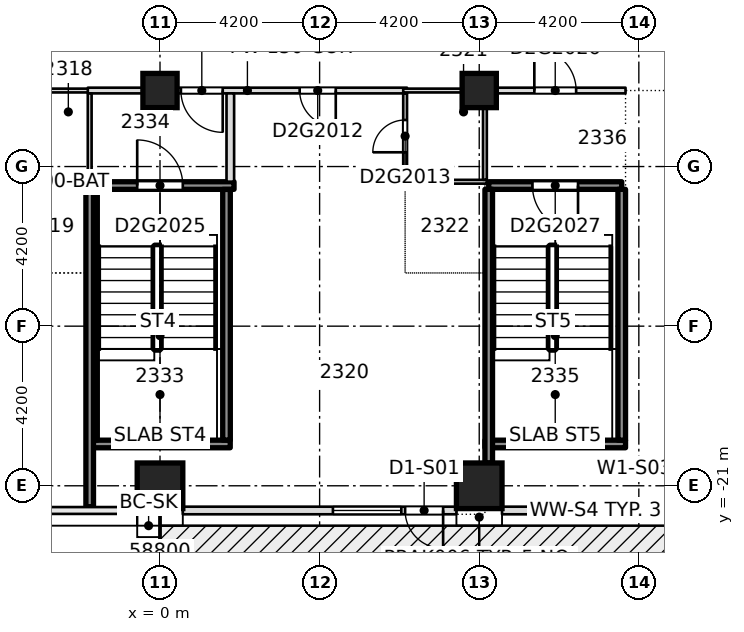
"""IFC4 building model, lengths in metres.
Left out: names, types, materials, properties, quantities, classifications, styles, units other than length and angle.
Written with IfcOpenShell. Run it as: python <this file> out.ifc"""

import sys

from ifc_helpers import new_model, si_unit, direction, frame, frame_2d, origin, origin_2d, place, context, subcontext, project, spatial, rectangle, extrude, element, fill, save


model = new_model("IFC4")
c1 = context("Model", 3, precision=1e-05, world=origin(), true_north=direction((0.0, 1.0)))
c2 = subcontext(c1, "Body", "Model", "MODEL_VIEW")
j1 = project(units=[si_unit("LENGTHUNIT", "METRE"), si_unit("PLANEANGLEUNIT", "RADIAN")], contexts=[c1])
p1 = place(None, origin())
s1 = spatial("IfcSite", under=j1, at=p1, CompositionType="ELEMENT")
p2 = place(p1, origin())
s2 = spatial("IfcBuilding", under=s1, at=p2, CompositionType="ELEMENT")
p3 = place(p2, frame((0.0, 0.0, 94.2)))
s3 = spatial("IfcBuildingStorey", under=s2, at=p3, CompositionType="ELEMENT", Elevation=94.2)
for number, where, z_axis, x_axis in (
    (1, (0.0, -21.0, -0.32), (0.0, 0.0, 1.0), (1.0, 0.0, 0.0)),
    (2, (8.4, -21.0, -0.32), (0.0, 0.0, 1.0), (1.0, 0.0, 0.0)),
):
    element("IfcColumn", number, at=place(p3, frame(where, z_axis=z_axis, x_axis=x_axis)), inside=s3, PredefinedType="COLUMN", context=c2, shape_type="SweptSolid", body=[
        extrude(rectangle(XDim=1.2, YDim=1.2, at=origin_2d()), origin(), (0.0, 0.0, 1.0), 3.45),
    ])
for number, where, z_axis, x_axis in (
    (3, (0.0, -10.6, -0.32), (0.0, 0.0, 1.0), (1.0, 0.0, 0.0)),
    (4, (8.4, -10.6, -0.32), (0.0, 0.0, 1.0), (1.0, 0.0, 0.0)),
):
    element("IfcColumn", number, at=place(p3, frame(where, z_axis=z_axis, x_axis=x_axis)), inside=s3, PredefinedType="COLUMN", context=c2, shape_type="SweptSolid", body=[
        extrude(rectangle(XDim=0.9, YDim=0.9, at=origin_2d()), origin(), (0.0, 0.0, 1.0), 3.45),
    ])
p4 = place(p3, frame((-1.848, -19.9, 0.0), z_axis=(0.0, 0.0, 1.0), x_axis=(1.0, 0.0, 0.0)))
e5 = element("IfcWall", 5, at=p4, inside=s3, PredefinedType="SOLIDWALL", context=c2, shape_type="SweptSolid", body=[
    extrude(rectangle(XDim=3.696, YDim=0.2, at=frame_2d((1.848, 0.0))), origin(), (0.0, 0.0, 1.0), 3.13),
])
p5 = place(p3, frame((-1.748, -13.1, 0.0), z_axis=(0.0, 0.0, 1.0), x_axis=(1.0, 0.0, 0.0)))
e6 = element("IfcWall", 6, at=p5, inside=s3, PredefinedType="SOLIDWALL", context=c2, shape_type="SweptSolid", body=[
    extrude(rectangle(XDim=3.696, YDim=0.2, at=frame_2d((1.848, 0.0))), origin(), (0.0, 0.0, 1.0), 3.13),
])
p6 = place(p5, frame((1.148, 0.0, 0.0)))
e7 = element("IfcOpeningElement", 7, at=p6, cuts=e6, PredefinedType="OPENING", context=c2, shape_type="SweptSolid", body=[
    extrude(rectangle(XDim=1.2, YDim=2.1, at=frame_2d((0.6, 1.05))), frame((0.0, 0.11, 0.0), z_axis=(0.0, -1.0, 0.0), x_axis=(1.0, 0.0, 0.0)), (0.0, 0.0, 1.0), 0.22),
])
p7 = place(p3, frame((8.65, -13.1, 0.0), z_axis=(0.0, 0.0, 1.0), x_axis=(1.0, 0.0, 0.0)))
e8 = element("IfcWall", 8, at=p7, inside=s3, PredefinedType="SOLIDWALL", context=c2, shape_type="SweptSolid", body=[
    extrude(rectangle(XDim=3.5, YDim=0.2, at=frame_2d((1.75, 0.0))), origin(), (0.0, 0.0, 1.0), 3.13),
])
p8 = place(p7, frame((1.15, 0.0, 0.0)))
e9 = element("IfcOpeningElement", 9, at=p8, cuts=e8, PredefinedType="OPENING", context=c2, shape_type="SweptSolid", body=[
    extrude(rectangle(XDim=1.2, YDim=2.1, at=frame_2d((0.6, 1.05))), frame((0.0, 0.11, 0.0), z_axis=(0.0, -1.0, 0.0), x_axis=(1.0, 0.0, 0.0)), (0.0, 0.0, 1.0), 0.22),
])
p9 = place(p3, frame((-4.0, -13.0, 0.0), z_axis=(0.0, 0.0, 1.0), x_axis=(1.0, 0.0, 0.0)))
e10 = element("IfcWall", 10, at=p9, inside=s3, PredefinedType="PARTITIONING", context=c2, shape_type="SweptSolid", body=[
    extrude(rectangle(XDim=2.25, YDim=0.1, at=frame_2d((1.125, 0.0))), origin(), (0.0, 0.0, 1.0), 3.13),
])
p10 = place(p3, frame((6.4, -13.0, 0.0), z_axis=(0.0, 0.0, 1.0), x_axis=(1.0, 0.0, 0.0)))
e11 = element("IfcWall", 11, at=p10, inside=s3, PredefinedType="PARTITIONING", context=c2, shape_type="SweptSolid", body=[
    extrude(rectangle(XDim=2.2, YDim=0.1, at=frame_2d((1.1, 0.0))), origin(), (0.0, 0.0, 1.0), 3.13),
])
p11 = place(p3, frame((-4.0, -10.6, 0.0), z_axis=(0.0, 0.0, 1.0), x_axis=(1.0, 0.0, 0.0)))
e12 = element("IfcWall", 12, at=p11, inside=s3, PredefinedType="PARTITIONING", context=c2, shape_type="SweptSolid", body=[
    extrude(rectangle(XDim=2.2, YDim=0.1, at=frame_2d((1.1, 0.0))), origin(), (0.0, 0.0, 1.0), 3.13),
])
p12 = place(p3, frame((-1.9, -10.6, 0.0), z_axis=(0.0, 0.0, 1.0), x_axis=(1.0, 0.0, 0.0)))
e13 = element("IfcWall", 13, at=p12, inside=s3, PredefinedType="PARTITIONING", context=c2, shape_type="SweptSolid", body=[
    extrude(rectangle(XDim=8.4, YDim=0.15, at=frame_2d((4.2, 0.0))), origin(), (0.0, 0.0, 1.0), 3.13),
])
p13 = place(p12, frame((5.575, 0.0, 0.0)))
e14 = element("IfcOpeningElement", 14, at=p13, cuts=e13, PredefinedType="OPENING", context=c2, shape_type="SweptSolid", body=[
    extrude(rectangle(XDim=0.95, YDim=2.1, at=frame_2d((0.475, 1.05))), frame((0.0, 0.085, 0.0), z_axis=(0.0, -1.0, 0.0), x_axis=(1.0, 0.0, 0.0)), (0.0, 0.0, 1.0), 0.17),
])
p14 = place(p12, frame((2.45, 0.0, 0.0)))
e15 = element("IfcOpeningElement", 15, at=p14, cuts=e13, PredefinedType="OPENING", context=c2, shape_type="SweptSolid", body=[
    extrude(rectangle(XDim=1.1, YDim=2.1, at=frame_2d((0.55, 1.05))), frame((0.0, 0.085, 0.0), z_axis=(0.0, -1.0, 0.0), x_axis=(1.0, 0.0, 0.0)), (0.0, 0.0, 1.0), 0.17),
])
p15 = place(p3, frame((6.4, -10.6, 0.0), z_axis=(0.0, 0.0, 1.0), x_axis=(1.0, 0.0, 0.0)))
e16 = element("IfcWall", 16, at=p15, inside=s3, PredefinedType="PARTITIONING", context=c2, shape_type="SweptSolid", body=[
    extrude(rectangle(XDim=2.2, YDim=0.1, at=frame_2d((1.1, 0.0))), origin(), (0.0, 0.0, 1.0), 3.13),
])
p16 = place(p3, frame((8.5, -10.6, 0.0), z_axis=(0.0, 0.0, 1.0), x_axis=(1.0, 0.0, 0.0)))
e17 = element("IfcWall", 17, at=p16, inside=s3, PredefinedType="PARTITIONING", context=c2, shape_type="SweptSolid", body=[
    extrude(rectangle(XDim=3.75, YDim=0.15, at=frame_2d((1.875, 0.0))), origin(), (0.0, 0.0, 1.0), 3.13),
])
p17 = place(p16, frame((1.35, 0.0, 0.0)))
e18 = element("IfcOpeningElement", 18, at=p17, cuts=e17, PredefinedType="OPENING", context=c2, shape_type="SweptSolid", body=[
    extrude(rectangle(XDim=1.1, YDim=2.1, at=frame_2d((0.55, 1.05))), frame((0.0, 0.085, 0.0), z_axis=(0.0, -1.0, 0.0), x_axis=(1.0, 0.0, 0.0)), (0.0, 0.0, 1.0), 0.17),
])
p18 = place(p3, frame((-1.85, -12.95, 0.0), z_axis=(0.0, 0.0, 1.0), x_axis=(0.0, 1.0, 0.0)))
e19 = element("IfcWall", 19, at=p18, inside=s3, PredefinedType="PARTITIONING", context=c2, shape_type="SweptSolid", body=[
    extrude(rectangle(XDim=2.275, YDim=0.1, at=frame_2d((1.137, 0.0))), origin(), (0.0, 0.0, 1.0), 3.13),
])
for number, where, z_axis, x_axis in (
    (20, (-1.75, -19.798, 0.0), (0.0, 0.0, 1.0), (0.0, 1.0, 0.0)),
    (21, (1.75, -19.798, 0.0), (0.0, 0.0, 1.0), (0.0, 1.0, 0.0)),
):
    element("IfcWall", number, at=place(p3, frame(where, z_axis=z_axis, x_axis=x_axis)), inside=s3, PredefinedType="SOLIDWALL", context=c2, shape_type="SweptSolid", body=[
        extrude(rectangle(XDim=6.596, YDim=0.2, at=frame_2d((3.298, 0.0))), origin(), (0.0, 0.0, 1.0), 3.13),
    ])
p19 = place(p3, frame((1.85, -12.998, 0.0), z_axis=(0.0, 0.0, 1.0), x_axis=(0.0, 1.0, 0.0)))
e22 = element("IfcWall", 22, at=p19, inside=s3, PredefinedType="PARTITIONING", context=c2, shape_type="SweptSolid", body=[
    extrude(rectangle(XDim=2.323, YDim=0.2, at=frame_2d((1.162, 0.0))), origin(), (0.0, 0.0, 1.0), 3.13),
])
p20 = place(p3, frame((6.45, -12.95, 0.0), z_axis=(0.0, 0.0, 1.0), x_axis=(0.0, 1.0, 0.0)))
e23 = element("IfcWall", 23, at=p20, inside=s3, PredefinedType="PARTITIONING", context=c2, shape_type="SweptSolid", body=[
    extrude(rectangle(XDim=2.275, YDim=0.1, at=frame_2d((1.137, 0.0))), origin(), (0.0, 0.0, 1.0), 3.13),
])
p21 = place(p20, frame((0.725, 0.0, 0.0)))
e24 = element("IfcOpeningElement", 24, at=p21, cuts=e23, PredefinedType="OPENING", context=c2, shape_type="SweptSolid", body=[
    extrude(rectangle(XDim=0.85, YDim=2.1, at=frame_2d((0.425, 1.05))), frame((0.0, 0.06, 0.0), z_axis=(0.0, -1.0, 0.0), x_axis=(1.0, 0.0, 0.0)), (0.0, 0.0, 1.0), 0.12),
])
p22 = place(p3, frame((8.55, -12.95, 0.0), z_axis=(0.0, 0.0, 1.0), x_axis=(0.0, 1.0, 0.0)))
e25 = element("IfcWall", 25, at=p22, inside=s3, PredefinedType="PARTITIONING", context=c2, shape_type="SweptSolid", body=[
    extrude(rectangle(XDim=2.275, YDim=0.1, at=frame_2d((1.137, 0.0))), origin(), (0.0, 0.0, 1.0), 3.13),
])
p23 = place(p3, frame((0.6, -21.65, 0.0), z_axis=(0.0, 0.0, 1.0), x_axis=(1.0, 0.0, 0.0)))
e26 = element("IfcWall", 26, at=p23, inside=s3, PredefinedType="STANDARD", context=c2, shape_type="SweptSolid", body=[
    extrude(rectangle(XDim=7.2, YDim=0.2, at=frame_2d((3.6, 0.0))), origin(), (0.0, 0.0, 1.0), 3.13),
])
p24 = place(p23, frame((3.95, 0.0, 0.2)))
e27 = element("IfcOpeningElement", 27, at=p24, cuts=e26, PredefinedType="OPENING", context=c2, shape_type="SweptSolid", body=[
    extrude(rectangle(XDim=1.8, YDim=2.65, at=frame_2d((0.9, 1.325))), frame((0.0, 0.11, 0.0), z_axis=(0.0, -1.0, 0.0), x_axis=(1.0, 0.0, 0.0)), (0.0, 0.0, 1.0), 0.22),
])
p25 = place(p23, frame((5.85, 0.0, 0.0)))
e28 = element("IfcOpeningElement", 28, at=p25, cuts=e26, PredefinedType="OPENING", context=c2, shape_type="SweptSolid", body=[
    extrude(rectangle(XDim=1.0, YDim=2.4, at=frame_2d((0.5, 1.2))), frame((0.0, 0.11, 0.0), z_axis=(0.0, -1.0, 0.0), x_axis=(1.0, 0.0, 0.0)), (0.0, 0.0, 1.0), 0.22),
])
p26 = place(p3, frame((9.0, -21.65, 0.0), z_axis=(0.0, 0.0, 1.0), x_axis=(1.0, 0.0, 0.0)))
e29 = element("IfcWall", 29, at=p26, inside=s3, PredefinedType="STANDARD", context=c2, shape_type="SweptSolid", body=[
    extrude(rectangle(XDim=7.2, YDim=0.2, at=frame_2d((3.6, 0.0))), origin(), (0.0, 0.0, 1.0), 3.13),
])
p27 = place(p26, frame((3.95, 0.0, 0.2)))
e30 = element("IfcOpeningElement", 30, at=p27, cuts=e29, PredefinedType="OPENING", context=c2, shape_type="SweptSolid", body=[
    extrude(rectangle(XDim=1.8, YDim=2.65, at=frame_2d((0.9, 1.325))), frame((0.0, 0.11, 0.0), z_axis=(0.0, -1.0, 0.0), x_axis=(1.0, 0.0, 0.0)), (0.0, 0.0, 1.0), 0.22),
])
p28 = place(p26, frame((5.85, 0.0, 0.0)))
e31 = element("IfcOpeningElement", 31, at=p28, cuts=e29, PredefinedType="OPENING", context=c2, shape_type="SweptSolid", body=[
    extrude(rectangle(XDim=1.0, YDim=2.4, at=frame_2d((0.5, 1.2))), frame((0.0, 0.11, 0.0), z_axis=(0.0, -1.0, 0.0), x_axis=(1.0, 0.0, 0.0)), (0.0, 0.0, 1.0), 0.22),
])
p29 = place(p3, frame((8.55, -19.9, 0.0), z_axis=(0.0, 0.0, 1.0), x_axis=(1.0, 0.0, 0.0)))
e32 = element("IfcWall", 32, at=p29, inside=s3, PredefinedType="SOLIDWALL", context=c2, shape_type="SweptSolid", body=[
    extrude(rectangle(XDim=3.7, YDim=0.2, at=frame_2d((1.85, 0.0))), origin(), (0.0, 0.0, 1.0), 3.13),
])
p30 = place(p3, frame((8.65, -20.4, 0.0), z_axis=(0.0, 0.0, 1.0), x_axis=(0.0, 1.0, 0.0)))
e33 = element("IfcWall", 33, at=p30, inside=s3, PredefinedType="SOLIDWALL", context=c2, shape_type="SweptSolid", body=[
    extrude(rectangle(XDim=7.2, YDim=0.2, at=frame_2d((3.6, 0.0))), origin(), (0.0, 0.0, 1.0), 3.13),
])
p31 = place(p3, frame((12.15, -19.8, 0.0), z_axis=(0.0, 0.0, 1.0), x_axis=(0.0, 1.0, 0.0)))
e34 = element("IfcWall", 34, at=p31, inside=s3, PredefinedType="SOLIDWALL", context=c2, shape_type="SweptSolid", body=[
    extrude(rectangle(XDim=6.6, YDim=0.2, at=frame_2d((3.3, 0.0))), origin(), (0.0, 0.0, 1.0), 3.13),
])
p32 = place(p3, frame((-1.85, -21.55, 0.0), z_axis=(0.0, 0.0, 1.0), x_axis=(0.0, 1.0, 0.0)))
e35 = element("IfcWall", 35, at=p32, inside=s3, PredefinedType="SOLIDWALL", context=c2, shape_type="SweptSolid", body=[
    extrude(rectangle(XDim=8.5, YDim=0.2, at=frame_2d((4.25, 0.0))), origin(), (0.0, 0.0, 1.0), 3.13),
])
p33 = place(p13, origin())
e36 = element("IfcDoor", 36, at=p33, inside=s3, OperationType="SINGLE_SWING_LEFT", PredefinedType="DOOR", context=c2, shape_type="SweptSolid", body=[
    extrude(rectangle(XDim=0.95, YDim=2.1, at=frame_2d((0.475, 1.05))), frame((0.0, 0.025, 0.0), z_axis=(0.0, -1.0, 0.0), x_axis=(1.0, 0.0, 0.0)), (0.0, 0.0, 1.0), 0.05),
])
fill(e14, e36)
p34 = place(p21, origin())
e37 = element("IfcDoor", 37, at=p34, inside=s3, OperationType="SINGLE_SWING_RIGHT", PredefinedType="DOOR", context=c2, shape_type="SweptSolid", body=[
    extrude(rectangle(XDim=0.85, YDim=2.1, at=frame_2d((0.425, 1.05))), frame((0.0, 0.025, 0.0), z_axis=(0.0, -1.0, 0.0), x_axis=(1.0, 0.0, 0.0)), (0.0, 0.0, 1.0), 0.05),
])
fill(e24, e37)
p35 = place(p14, origin())
e38 = element("IfcDoor", 38, at=p35, inside=s3, OperationType="SINGLE_SWING_LEFT", PredefinedType="DOOR", context=c2, shape_type="SweptSolid", body=[
    extrude(rectangle(XDim=1.1, YDim=2.1, at=frame_2d((0.55, 1.05))), frame((0.0, 0.025, 0.0), z_axis=(0.0, -1.0, 0.0), x_axis=(1.0, 0.0, 0.0)), (0.0, 0.0, 1.0), 0.05),
])
fill(e15, e38)
p36 = place(p6, origin())
e39 = element("IfcDoor", 39, at=p36, inside=s3, OperationType="SINGLE_SWING_RIGHT", PredefinedType="DOOR", context=c2, shape_type="SweptSolid", body=[
    extrude(rectangle(XDim=1.2, YDim=2.1, at=frame_2d((0.6, 1.05))), frame((0.0, 0.025, 0.0), z_axis=(0.0, -1.0, 0.0), x_axis=(1.0, 0.0, 0.0)), (0.0, 0.0, 1.0), 0.05),
])
fill(e7, e39)
p37 = place(p17, origin())
e40 = element("IfcDoor", 40, at=p37, inside=s3, OperationType="SINGLE_SWING_RIGHT", PredefinedType="DOOR", context=c2, shape_type="SweptSolid", body=[
    extrude(rectangle(XDim=1.1, YDim=2.1, at=frame_2d((0.55, 1.05))), frame((0.0, 0.025, 0.0), z_axis=(0.0, -1.0, 0.0), x_axis=(1.0, 0.0, 0.0)), (0.0, 0.0, 1.0), 0.05),
])
fill(e18, e40)
p38 = place(p8, origin())
e41 = element("IfcDoor", 41, at=p38, inside=s3, OperationType="SINGLE_SWING_RIGHT", PredefinedType="DOOR", context=c2, shape_type="SweptSolid", body=[
    extrude(rectangle(XDim=1.2, YDim=2.1, at=frame_2d((0.6, 1.05))), frame((0.0, 0.025, 0.0), z_axis=(0.0, -1.0, 0.0), x_axis=(1.0, 0.0, 0.0)), (0.0, 0.0, 1.0), 0.05),
])
fill(e9, e41)
p39 = place(p24, origin())
e42 = element("IfcWindow", 42, at=p39, inside=s3, PartitioningType="SINGLE_PANEL", PredefinedType="WINDOW", context=c2, shape_type="SweptSolid", body=[
    extrude(rectangle(XDim=1.8, YDim=2.65, at=frame_2d((0.9, 1.325))), frame((0.0, 0.03, 0.0), z_axis=(0.0, -1.0, 0.0), x_axis=(1.0, 0.0, 0.0)), (0.0, 0.0, 1.0), 0.06),
])
fill(e27, e42)
p40 = place(p25, origin())
e43 = element("IfcDoor", 43, at=p40, inside=s3, OperationType="SINGLE_SWING_LEFT", PredefinedType="DOOR", context=c2, shape_type="SweptSolid", body=[
    extrude(rectangle(XDim=1.0, YDim=2.4, at=frame_2d((0.5, 1.2))), frame((0.0, 0.025, 0.0), z_axis=(0.0, -1.0, 0.0), x_axis=(1.0, 0.0, 0.0)), (0.0, 0.0, 1.0), 0.05),
])
fill(e28, e43)
p41 = place(p27, origin())
e44 = element("IfcWindow", 44, at=p41, inside=s3, PartitioningType="SINGLE_PANEL", PredefinedType="WINDOW", context=c2, shape_type="SweptSolid", body=[
    extrude(rectangle(XDim=1.8, YDim=2.65, at=frame_2d((0.9, 1.325))), frame((0.0, 0.03, 0.0), z_axis=(0.0, -1.0, 0.0), x_axis=(1.0, 0.0, 0.0)), (0.0, 0.0, 1.0), 0.06),
])
fill(e30, e44)
save(model, sys.argv[1])
